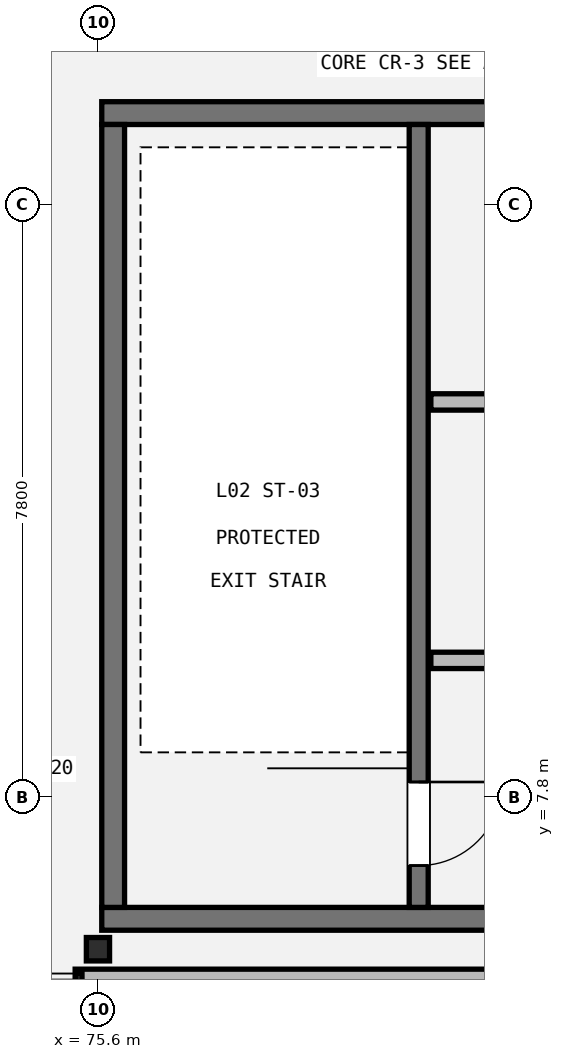
"""IFC4 building model, lengths in metres.
Left out: names, types, materials, properties, quantities, classifications, styles, units other than length and angle.
Written with IfcOpenShell. Run it as: python <this file> out.ifc"""

import sys

from ifc_helpers import new_model, si_unit, direction, frame, frame_2d, origin, origin_2d, place, context, subcontext, project, spatial, rectangle, i_section, extrude, element, fill, save


model = new_model("IFC4")
c1 = context("Model", 3, precision=1e-05, world=origin(), true_north=direction((0.0, 1.0)))
c2 = subcontext(c1, "Body", "Model", "MODEL_VIEW")
j1 = project(units=[si_unit("LENGTHUNIT", "METRE"), si_unit("PLANEANGLEUNIT", "RADIAN")], contexts=[c1])
p1 = place(None, origin())
s1 = spatial("IfcSite", under=j1, at=p1, CompositionType="ELEMENT")
p2 = place(p1, origin())
s2 = spatial("IfcBuilding", under=s1, at=p2, CompositionType="ELEMENT")
p3 = place(p2, frame((0.0, 0.0, 10.2)))
s3 = spatial("IfcBuildingStorey", under=s2, at=p3, CompositionType="ELEMENT", Elevation=10.2)
p4 = place(p3, frame((75.6, 5.8, 0.0), z_axis=(0.0, 0.0, 1.0), x_axis=(1.0, 0.0, 0.0)))
e1 = element("IfcColumn", 1, at=p4, inside=s3, PredefinedType="COLUMN", context=c2, shape_type="SweptSolid", body=[
    extrude(i_section(OverallWidth=0.305, OverallDepth=0.308, WebThickness=0.01, FlangeThickness=0.015, FilletRadius=0.015, at=origin_2d()), origin(), (0.0, 0.0, 1.0), 4.8),
])
p5 = place(p3, frame((84.3, 5.4, 0.0), z_axis=(0.0, 0.0, 1.0), x_axis=(-1.0, 0.0, 0.0)))
e2 = element("IfcWall", 2, at=p5, inside=s3, PredefinedType="STANDARD", context=c2, shape_type="SweptSolid", body=[
    extrude(rectangle(XDim=9.0, YDim=0.275, at=frame_2d((4.5, 0.0))), origin(), (0.0, 0.0, 1.0), 4.028),
])
for number, where, z_axis, x_axis in (
    (3, (84.15, 6.2, 0.0), (0.0, 0.0, 1.0), (-1.0, 0.0, 0.0)),
    (4, (75.65, 16.8, 0.0), (0.0, 0.0, 1.0), (1.0, 0.0, 0.0)),
):
    element("IfcWall", number, at=place(p3, frame(where, z_axis=z_axis, x_axis=x_axis)), inside=s3, PredefinedType="SHEAR", context=c2, shape_type="SweptSolid", body=[
        extrude(rectangle(XDim=8.5, YDim=0.3, at=frame_2d((4.25, 0.0))), origin(), (0.0, 0.0, 1.0), 4.6),
    ])
p6 = place(p3, frame((75.8, 6.35, 0.0), z_axis=(0.0, 0.0, 1.0), x_axis=(0.0, 1.0, 0.0)))
e5 = element("IfcWall", 5, at=p6, inside=s3, PredefinedType="SHEAR", context=c2, shape_type="SweptSolid", body=[
    extrude(rectangle(XDim=10.3, YDim=0.3, at=frame_2d((5.15, 0.0))), origin(), (0.0, 0.0, 1.0), 4.6),
])
p7 = place(p3, frame((79.82, 16.65, 0.0), z_axis=(0.0, 0.0, 1.0), x_axis=(0.0, -1.0, 0.0)))
e6 = element("IfcWall", 6, at=p7, inside=s3, PredefinedType="SHEAR", context=c2, shape_type="SweptSolid", body=[
    extrude(rectangle(XDim=10.3, YDim=0.25, at=frame_2d((5.15, 0.0))), origin(), (0.0, 0.0, 1.0), 4.6),
])
p8 = place(p7, frame((8.65, 0.0, 0.0)))
e7 = element("IfcOpeningElement", 7, at=p8, cuts=e6, PredefinedType="OPENING", context=c2, shape_type="SweptSolid", body=[
    extrude(rectangle(XDim=1.1, YDim=2.15, at=frame_2d((0.55, 1.075))), frame((0.0, 0.135, 0.0), z_axis=(0.0, -1.0, 0.0), x_axis=(1.0, 0.0, 0.0)), (0.0, 0.0, 1.0), 0.27),
])
p9 = place(p3, frame((79.98, 9.6, 0.0), z_axis=(0.0, 0.0, 1.0), x_axis=(1.0, 0.0, 0.0)))
e8 = element("IfcWall", 8, at=p9, inside=s3, PredefinedType="STANDARD", context=c2, shape_type="SweptSolid", body=[
    extrude(rectangle(XDim=3.85, YDim=0.215, at=frame_2d((1.925, 0.0))), origin(), (0.0, 0.0, 1.0), 3.95),
])
p10 = place(p9, frame((1.4, 0.0, 0.0)))
e9 = element("IfcOpeningElement", 9, at=p10, cuts=e8, PredefinedType="OPENING", context=c2, shape_type="SweptSolid", body=[
    extrude(rectangle(XDim=1.05, YDim=2.15, at=frame_2d((0.525, 1.075))), frame((0.0, 0.117, 0.0), z_axis=(0.0, -1.0, 0.0), x_axis=(1.0, 0.0, 0.0)), (0.0, 0.0, 1.0), 0.235),
])
p11 = place(p3, frame((79.98, 13.0, 0.0), z_axis=(0.0, 0.0, 1.0), x_axis=(1.0, 0.0, 0.0)))
e10 = element("IfcWall", 10, at=p11, inside=s3, PredefinedType="STANDARD", context=c2, shape_type="SweptSolid", body=[
    extrude(rectangle(XDim=3.85, YDim=0.215, at=frame_2d((1.925, 0.0))), origin(), (0.0, 0.0, 1.0), 3.95),
])
p12 = place(p11, frame((1.4, 0.0, 0.0)))
e11 = element("IfcOpeningElement", 11, at=p12, cuts=e10, PredefinedType="OPENING", context=c2, shape_type="SweptSolid", body=[
    extrude(rectangle(XDim=1.05, YDim=2.15, at=frame_2d((0.525, 1.075))), frame((0.0, 0.117, 0.0), z_axis=(0.0, -1.0, 0.0), x_axis=(1.0, 0.0, 0.0)), (0.0, 0.0, 1.0), 0.235),
])
p13 = place(p8, origin())
e12 = element("IfcDoor", 12, at=p13, inside=s3, OperationType="SINGLE_SWING_LEFT", PredefinedType="DOOR", context=c2, shape_type="SweptSolid", body=[
    extrude(rectangle(XDim=1.1, YDim=2.15, at=frame_2d((0.55, 1.075))), frame((0.0, 0.025, 0.0), z_axis=(0.0, -1.0, 0.0), x_axis=(1.0, 0.0, 0.0)), (0.0, 0.0, 1.0), 0.05),
])
fill(e7, e12)
save(model, sys.argv[1])
